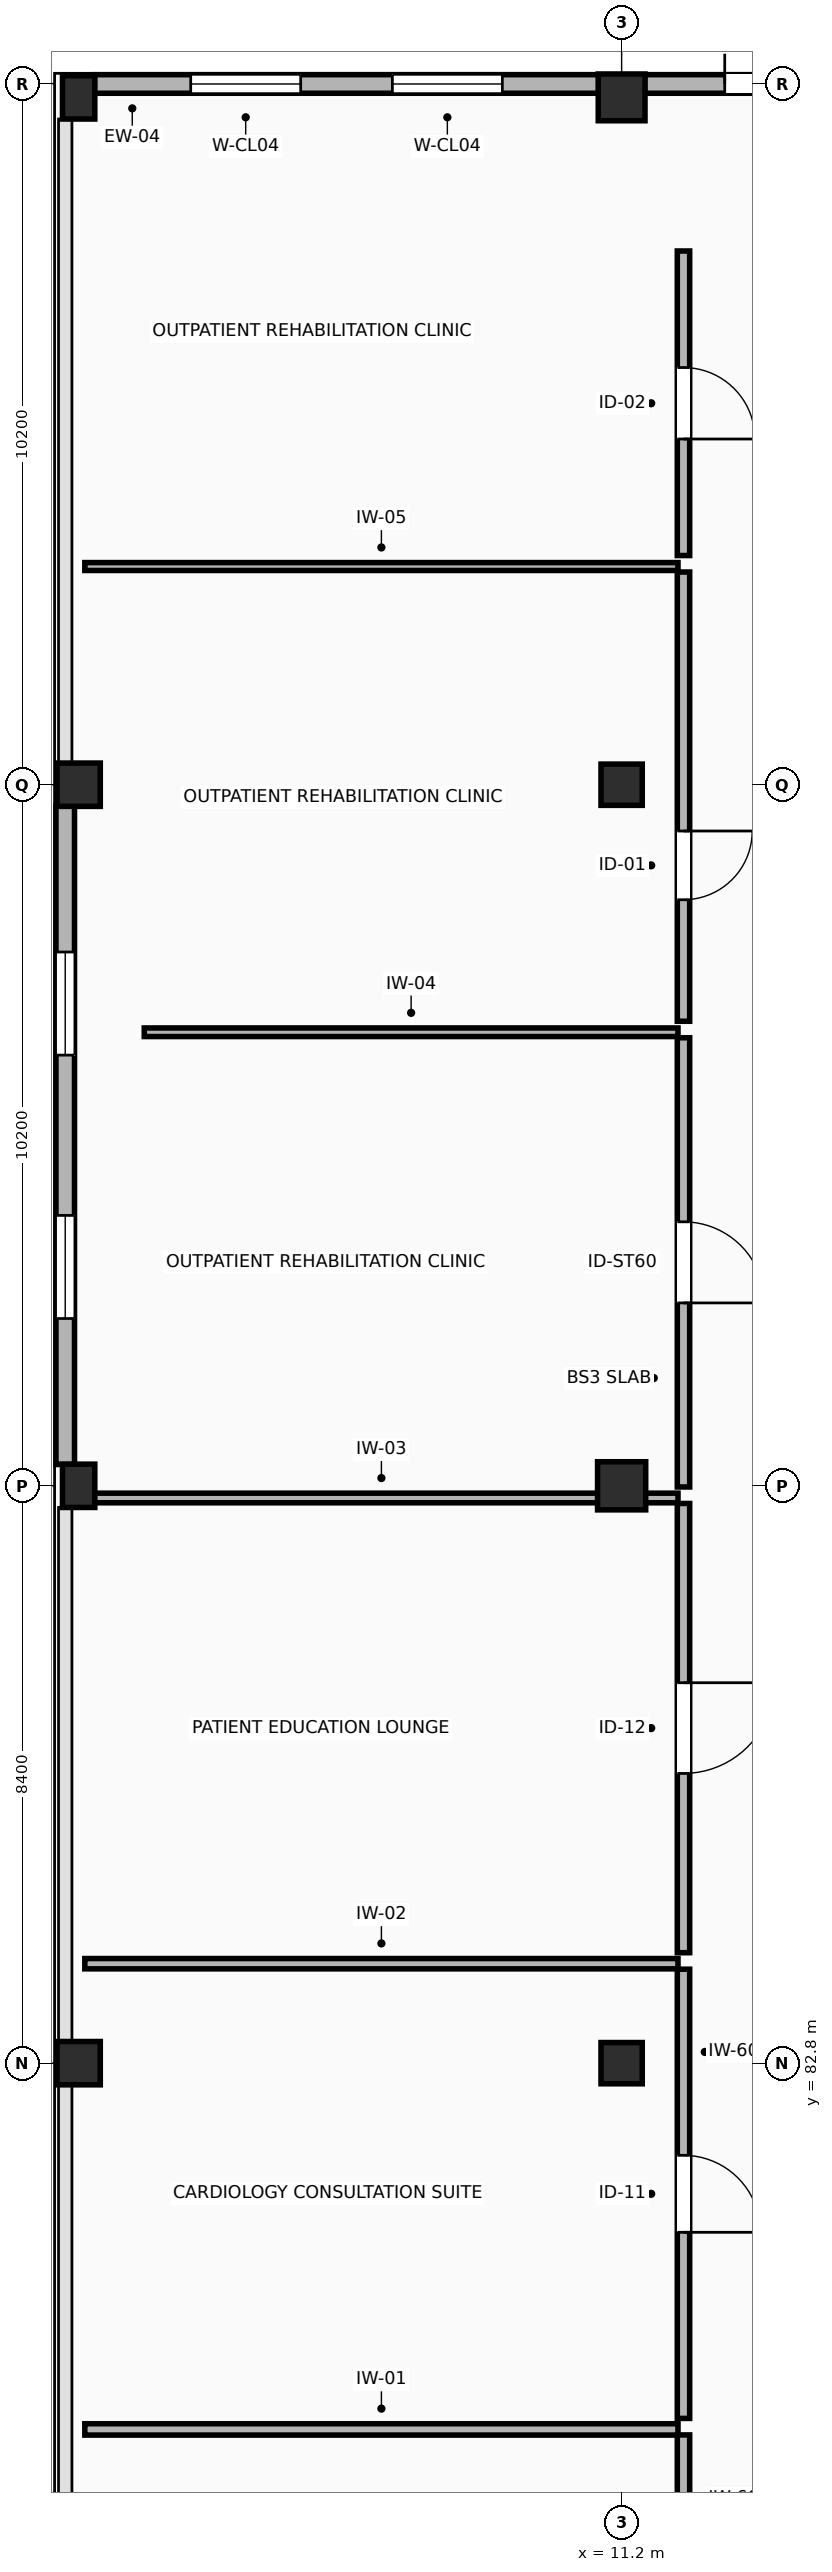
"""IFC4 building model, lengths in metres.
Left out: names, types, materials, properties, quantities, classifications, styles, units other than length and angle.
Written with IfcOpenShell. Run it as: python <this file> out.ifc"""

import sys

from ifc_helpers import new_model, si_unit, direction, frame, frame_2d, origin, origin_2d, place, context, subcontext, project, spatial, rectangle, extrude, element, fill, save


model = new_model("IFC4")
c1 = context("Model", 3, precision=1e-05, world=origin(), true_north=direction((0.0, 1.0)))
c2 = subcontext(c1, "Body", "Model", "MODEL_VIEW")
j1 = project(units=[si_unit("LENGTHUNIT", "METRE"), si_unit("PLANEANGLEUNIT", "RADIAN")], contexts=[c1])
p1 = place(None, origin())
s1 = spatial("IfcSite", under=j1, at=p1, CompositionType="ELEMENT")
p2 = place(p1, origin())
s2 = spatial("IfcBuilding", under=s1, at=p2, CompositionType="ELEMENT")
p3 = place(p2, origin())
s3 = spatial("IfcBuildingStorey", under=s2, at=p3, CompositionType="ELEMENT", Elevation=0.0)
p4 = place(p3, frame((3.3, 82.8, -1.75), z_axis=(0.0, 0.0, 1.0), x_axis=(1.0, 0.0, 0.0)))
e1 = element("IfcColumn", 1, at=p4, inside=s3, PredefinedType="COLUMN", context=c2, shape_type="SweptSolid", body=[
    extrude(rectangle(XDim=0.63, YDim=0.63, at=origin_2d()), origin(), (0.0, 0.0, 1.0), 7.15),
])
p5 = place(p3, frame((3.3, 91.2, -1.75), z_axis=(0.0, 0.0, 1.0), x_axis=(1.0, 0.0, 0.0)))
e2 = element("IfcColumn", 2, at=p5, inside=s3, PredefinedType="COLUMN", context=c2, shape_type="SweptSolid", body=[
    extrude(rectangle(XDim=0.47, YDim=0.63, at=origin_2d()), origin(), (0.0, 0.0, 1.0), 7.15),
])
p6 = place(p3, frame((3.3, 101.4, -1.75), z_axis=(0.0, 0.0, 1.0), x_axis=(1.0, 0.0, 0.0)))
e3 = element("IfcColumn", 3, at=p6, inside=s3, PredefinedType="COLUMN", context=c2, shape_type="SweptSolid", body=[
    extrude(rectangle(XDim=0.63, YDim=0.63, at=origin_2d()), origin(), (0.0, 0.0, 1.0), 7.15),
])
p7 = place(p3, frame((3.3, 111.4, -1.75), z_axis=(0.0, 0.0, 1.0), x_axis=(1.0, 0.0, 0.0)))
e4 = element("IfcColumn", 4, at=p7, inside=s3, PredefinedType="COLUMN", context=c2, shape_type="SweptSolid", body=[
    extrude(rectangle(XDim=0.47, YDim=0.63, at=origin_2d()), origin(), (0.0, 0.0, 1.0), 7.15),
])
p8 = place(p3, frame((11.2, 82.8, -1.75), z_axis=(0.0, 0.0, 1.0), x_axis=(1.0, 0.0, 0.0)))
e5 = element("IfcColumn", 5, at=p8, inside=s3, PredefinedType="COLUMN", context=c2, shape_type="SweptSolid", body=[
    extrude(rectangle(XDim=0.6, YDim=0.6, at=origin_2d()), origin(), (0.0, 0.0, 1.0), 7.15),
])
p9 = place(p3, frame((11.2, 91.2, -1.75), z_axis=(0.0, 0.0, 1.0), x_axis=(1.0, 0.0, 0.0)))
e6 = element("IfcColumn", 6, at=p9, inside=s3, PredefinedType="COLUMN", context=c2, shape_type="SweptSolid", body=[
    extrude(rectangle(XDim=0.7, YDim=0.7, at=origin_2d()), origin(), (0.0, 0.0, 1.0), 7.15),
])
p10 = place(p3, frame((11.2, 101.4, -1.75), z_axis=(0.0, 0.0, 1.0), x_axis=(1.0, 0.0, 0.0)))
e7 = element("IfcColumn", 7, at=p10, inside=s3, PredefinedType="COLUMN", context=c2, shape_type="SweptSolid", body=[
    extrude(rectangle(XDim=0.6, YDim=0.6, at=origin_2d()), origin(), (0.0, 0.0, 1.0), 7.15),
])
p11 = place(p3, frame((11.2, 111.4, -1.75), z_axis=(0.0, 0.0, 1.0), x_axis=(1.0, 0.0, 0.0)))
e8 = element("IfcColumn", 8, at=p11, inside=s3, PredefinedType="COLUMN", context=c2, shape_type="SweptSolid", body=[
    extrude(rectangle(XDim=0.68, YDim=0.68, at=origin_2d()), origin(), (0.0, 0.0, 1.0), 7.15),
])
p12 = place(p3, frame((19.29, 111.595, 0.0), z_axis=(0.0, 0.0, 1.0), x_axis=(-1.0, 0.0, 0.0)))
e9 = element("IfcWall", 9, at=p12, inside=s3, PredefinedType="STANDARD", context=c2, shape_type="SweptSolid", body=[
    extrude(rectangle(XDim=7.755, YDim=0.27, at=frame_2d((3.877, 0.0))), origin(), (0.0, 0.0, 1.0), 5.05),
])
p13 = place(p12, frame((4.59, 0.0, 0.0)))
e10 = element("IfcOpeningElement", 10, at=p13, cuts=e9, PredefinedType="OPENING", context=c2, shape_type="SweptSolid", body=[
    extrude(rectangle(XDim=2.0, YDim=2.4, at=frame_2d((1.0, 1.2))), frame((0.0, 0.145, 0.0), z_axis=(0.0, -1.0, 0.0), x_axis=(1.0, 0.0, 0.0)), (0.0, 0.0, 1.0), 0.29),
])
p14 = place(p3, frame((10.865, 111.595, 0.0), z_axis=(0.0, 0.0, 1.0), x_axis=(-1.0, 0.0, 0.0)))
e11 = element("IfcWall", 11, at=p14, inside=s3, PredefinedType="STANDARD", context=c2, shape_type="SweptSolid", body=[
    extrude(rectangle(XDim=7.335, YDim=0.27, at=frame_2d((3.667, 0.0))), origin(), (0.0, 0.0, 1.0), 5.05),
])
p15 = place(p14, frame((1.4, 0.0, 0.95)))
e12 = element("IfcOpeningElement", 12, at=p15, cuts=e11, PredefinedType="OPENING", context=c2, shape_type="SweptSolid", body=[
    extrude(rectangle(XDim=1.6, YDim=1.75, at=frame_2d((0.8, 0.875))), frame((0.0, 0.145, 0.0), z_axis=(0.0, -1.0, 0.0), x_axis=(1.0, 0.0, 0.0)), (0.0, 0.0, 1.0), 0.29),
])
p16 = place(p14, frame((4.334, 0.0, 0.95)))
e13 = element("IfcOpeningElement", 13, at=p16, cuts=e11, PredefinedType="OPENING", context=c2, shape_type="SweptSolid", body=[
    extrude(rectangle(XDim=1.6, YDim=1.75, at=frame_2d((0.8, 0.875))), frame((0.0, 0.145, 0.0), z_axis=(0.0, -1.0, 0.0), x_axis=(1.0, 0.0, 0.0)), (0.0, 0.0, 1.0), 0.29),
])
p17 = place(p3, frame((3.105, 101.09, 0.0), z_axis=(0.0, 0.0, 1.0), x_axis=(0.0, -1.0, 0.0)))
e14 = element("IfcWall", 14, at=p17, inside=s3, PredefinedType="STANDARD", context=c2, shape_type="SweptSolid", body=[
    extrude(rectangle(XDim=9.58, YDim=0.27, at=frame_2d((4.79, 0.0))), origin(), (0.0, 0.0, 1.0), 4.235),
])
p18 = place(p17, frame((2.124, 0.0, 0.95)))
e15 = element("IfcOpeningElement", 15, at=p18, cuts=e14, PredefinedType="OPENING", context=c2, shape_type="SweptSolid", body=[
    extrude(rectangle(XDim=1.5, YDim=1.65, at=frame_2d((0.75, 0.825))), frame((0.0, 0.145, 0.0), z_axis=(0.0, -1.0, 0.0), x_axis=(1.0, 0.0, 0.0)), (0.0, 0.0, 1.0), 0.29),
])
p19 = place(p17, frame((5.956, 0.0, 0.95)))
e16 = element("IfcOpeningElement", 16, at=p19, cuts=e14, PredefinedType="OPENING", context=c2, shape_type="SweptSolid", body=[
    extrude(rectangle(XDim=1.5, YDim=1.65, at=frame_2d((0.75, 0.825))), frame((0.0, 0.145, 0.0), z_axis=(0.0, -1.0, 0.0), x_axis=(1.0, 0.0, 0.0)), (0.0, 0.0, 1.0), 0.29),
])
p20 = place(p3, frame((3.39, 77.471, 0.0), z_axis=(0.0, 0.0, 1.0), x_axis=(1.0, 0.0, 0.0)))
e17 = element("IfcWall", 17, at=p20, inside=s3, PredefinedType="PARTITIONING", context=c2, shape_type="SweptSolid", body=[
    extrude(rectangle(XDim=8.63, YDim=0.165, at=frame_2d((4.315, 0.0))), origin(), (0.0, 0.0, 1.0), 5.05),
])
p21 = place(p3, frame((12.1, 77.391, 0.0), z_axis=(0.0, 0.0, 1.0), x_axis=(0.0, -1.0, 0.0)))
e18 = element("IfcWall", 18, at=p21, inside=s3, PredefinedType="PARTITIONING", context=c2, shape_type="SweptSolid", body=[
    extrude(rectangle(XDim=6.536, YDim=0.18, at=frame_2d((3.268, 0.0))), origin(), (0.0, 0.0, 1.0), 5.05),
])
p22 = place(p21, frame((2.158, 0.0, 0.0)))
e19 = element("IfcOpeningElement", 19, at=p22, cuts=e18, PredefinedType="OPENING", context=c2, shape_type="SweptSolid", body=[
    extrude(rectangle(XDim=1.22, YDim=2.18, at=frame_2d((0.61, 1.09))), frame((0.0, 0.1, 0.0), z_axis=(0.0, -1.0, 0.0), x_axis=(1.0, 0.0, 0.0)), (0.0, 0.0, 1.0), 0.2),
])
p23 = place(p3, frame((3.39, 84.247, 0.0), z_axis=(0.0, 0.0, 1.0), x_axis=(1.0, 0.0, 0.0)))
e20 = element("IfcWall", 20, at=p23, inside=s3, PredefinedType="PARTITIONING", context=c2, shape_type="SweptSolid", body=[
    extrude(rectangle(XDim=8.63, YDim=0.15, at=frame_2d((4.315, 0.0))), origin(), (0.0, 0.0, 1.0), 5.05),
])
p24 = place(p3, frame((12.1, 84.167, 0.0), z_axis=(0.0, 0.0, 1.0), x_axis=(0.0, -1.0, 0.0)))
e21 = element("IfcWall", 21, at=p24, inside=s3, PredefinedType="PARTITIONING", context=c2, shape_type="SweptSolid", body=[
    extrude(rectangle(XDim=6.536, YDim=0.18, at=frame_2d((3.268, 0.0))), origin(), (0.0, 0.0, 1.0), 5.05),
])
p25 = place(p24, frame((2.708, 0.0, 0.0)))
e22 = element("IfcOpeningElement", 22, at=p25, cuts=e21, PredefinedType="OPENING", context=c2, shape_type="SweptSolid", body=[
    extrude(rectangle(XDim=1.12, YDim=2.16, at=frame_2d((0.56, 1.08))), frame((0.0, 0.1, 0.0), z_axis=(0.0, -1.0, 0.0), x_axis=(1.0, 0.0, 0.0)), (0.0, 0.0, 1.0), 0.2),
])
p26 = place(p3, frame((3.39, 91.023, 0.0), z_axis=(0.0, 0.0, 1.0), x_axis=(1.0, 0.0, 0.0)))
e23 = element("IfcWall", 23, at=p26, inside=s3, PredefinedType="PARTITIONING", context=c2, shape_type="SweptSolid", body=[
    extrude(rectangle(XDim=8.63, YDim=0.14, at=frame_2d((4.315, 0.0))), origin(), (0.0, 0.0, 1.0), 5.05),
])
p27 = place(p3, frame((12.1, 90.943, 0.0), z_axis=(0.0, 0.0, 1.0), x_axis=(0.0, -1.0, 0.0)))
e24 = element("IfcWall", 24, at=p27, inside=s3, PredefinedType="PARTITIONING", context=c2, shape_type="SweptSolid", body=[
    extrude(rectangle(XDim=6.536, YDim=0.18, at=frame_2d((3.268, 0.0))), origin(), (0.0, 0.0, 1.0), 5.05),
])
p28 = place(p27, frame((2.608, 0.0, 0.0)))
e25 = element("IfcOpeningElement", 25, at=p28, cuts=e24, PredefinedType="OPENING", context=c2, shape_type="SweptSolid", body=[
    extrude(rectangle(XDim=1.32, YDim=2.22, at=frame_2d((0.66, 1.11))), frame((0.0, 0.1, 0.0), z_axis=(0.0, -1.0, 0.0), x_axis=(1.0, 0.0, 0.0)), (0.0, 0.0, 1.0), 0.2),
])
p29 = place(p3, frame((4.255, 97.799, 0.0), z_axis=(0.0, 0.0, 1.0), x_axis=(1.0, 0.0, 0.0)))
e26 = element("IfcWall", 26, at=p29, inside=s3, PredefinedType="PARTITIONING", context=c2, shape_type="SweptSolid", body=[
    extrude(rectangle(XDim=7.765, YDim=0.125, at=frame_2d((3.883, 0.0))), origin(), (0.0, 0.0, 1.0), 5.05),
])
p30 = place(p3, frame((12.1, 97.719, 0.0), z_axis=(0.0, 0.0, 1.0), x_axis=(0.0, -1.0, 0.0)))
e27 = element("IfcWall", 27, at=p30, inside=s3, PredefinedType="PARTITIONING", context=c2, shape_type="SweptSolid", body=[
    extrude(rectangle(XDim=6.536, YDim=0.18, at=frame_2d((3.268, 0.0))), origin(), (0.0, 0.0, 1.0), 5.05),
])
p31 = place(p30, frame((2.678, 0.0, 0.0)))
e28 = element("IfcOpeningElement", 28, at=p31, cuts=e27, PredefinedType="OPENING", context=c2, shape_type="SweptSolid", body=[
    extrude(rectangle(XDim=1.18, YDim=2.18, at=frame_2d((0.59, 1.09))), frame((0.0, 0.1, 0.0), z_axis=(0.0, -1.0, 0.0), x_axis=(1.0, 0.0, 0.0)), (0.0, 0.0, 1.0), 0.2),
])
p32 = place(p3, frame((3.39, 104.574, 0.0), z_axis=(0.0, 0.0, 1.0), x_axis=(1.0, 0.0, 0.0)))
e29 = element("IfcWall", 29, at=p32, inside=s3, PredefinedType="PARTITIONING", context=c2, shape_type="SweptSolid", body=[
    extrude(rectangle(XDim=8.63, YDim=0.115, at=frame_2d((4.315, 0.0))), origin(), (0.0, 0.0, 1.0), 5.05),
])
p33 = place(p3, frame((12.1, 104.494, 0.0), z_axis=(0.0, 0.0, 1.0), x_axis=(0.0, -1.0, 0.0)))
e30 = element("IfcWall", 30, at=p33, inside=s3, PredefinedType="PARTITIONING", context=c2, shape_type="SweptSolid", body=[
    extrude(rectangle(XDim=6.536, YDim=0.18, at=frame_2d((3.268, 0.0))), origin(), (0.0, 0.0, 1.0), 5.05),
])
p34 = place(p33, frame((3.768, 0.0, 0.0)))
e31 = element("IfcOpeningElement", 31, at=p34, cuts=e30, PredefinedType="OPENING", context=c2, shape_type="SweptSolid", body=[
    extrude(rectangle(XDim=1.0, YDim=2.15, at=frame_2d((0.5, 1.075))), frame((0.0, 0.1, 0.0), z_axis=(0.0, -1.0, 0.0), x_axis=(1.0, 0.0, 0.0)), (0.0, 0.0, 1.0), 0.2),
])
p35 = place(p3, frame((12.1, 109.165, 0.0), z_axis=(0.0, 0.0, 1.0), x_axis=(0.0, -1.0, 0.0)))
e32 = element("IfcWall", 32, at=p35, inside=s3, PredefinedType="PARTITIONING", context=c2, shape_type="SweptSolid", body=[
    extrude(rectangle(XDim=4.431, YDim=0.18, at=frame_2d((2.215, 0.0))), origin(), (0.0, 0.0, 1.0), 5.05),
])
p36 = place(p35, frame((1.695, 0.0, 0.0)))
e33 = element("IfcOpeningElement", 33, at=p36, cuts=e32, PredefinedType="OPENING", context=c2, shape_type="SweptSolid", body=[
    extrude(rectangle(XDim=1.04, YDim=2.15, at=frame_2d((0.52, 1.075))), frame((0.0, 0.1, 0.0), z_axis=(0.0, -1.0, 0.0), x_axis=(1.0, 0.0, 0.0)), (0.0, 0.0, 1.0), 0.2),
])
p37 = place(p13, frame((2.0, 0.0, 0.0), z_axis=(0.0, 0.0, 1.0), x_axis=(-1.0, 0.0, 0.0)))
e34 = element("IfcDoor", 34, at=p37, inside=s3, OperationType="DOUBLE_DOOR_SINGLE_SWING", PredefinedType="DOOR", context=c2, shape_type="SweptSolid", body=[
    extrude(rectangle(XDim=2.0, YDim=2.4, at=frame_2d((1.0, 1.2))), frame((0.0, 0.025, 0.0), z_axis=(0.0, -1.0, 0.0), x_axis=(1.0, 0.0, 0.0)), (0.0, 0.0, 1.0), 0.05),
])
fill(e10, e34)
p38 = place(p15, origin())
e35 = element("IfcWindow", 35, at=p38, inside=s3, PartitioningType="SINGLE_PANEL", PredefinedType="WINDOW", context=c2, shape_type="SweptSolid", body=[
    extrude(rectangle(XDim=1.6, YDim=1.75, at=frame_2d((0.8, 0.875))), frame((0.0, 0.03, 0.0), z_axis=(0.0, -1.0, 0.0), x_axis=(1.0, 0.0, 0.0)), (0.0, 0.0, 1.0), 0.06),
])
fill(e12, e35)
p39 = place(p16, origin())
e36 = element("IfcWindow", 36, at=p39, inside=s3, PartitioningType="SINGLE_PANEL", PredefinedType="WINDOW", context=c2, shape_type="SweptSolid", body=[
    extrude(rectangle(XDim=1.6, YDim=1.75, at=frame_2d((0.8, 0.875))), frame((0.0, 0.03, 0.0), z_axis=(0.0, -1.0, 0.0), x_axis=(1.0, 0.0, 0.0)), (0.0, 0.0, 1.0), 0.06),
])
fill(e13, e36)
p40 = place(p18, origin())
e37 = element("IfcWindow", 37, at=p40, inside=s3, PartitioningType="SINGLE_PANEL", PredefinedType="WINDOW", context=c2, shape_type="SweptSolid", body=[
    extrude(rectangle(XDim=1.5, YDim=1.65, at=frame_2d((0.75, 0.825))), frame((0.0, 0.03, 0.0), z_axis=(0.0, -1.0, 0.0), x_axis=(1.0, 0.0, 0.0)), (0.0, 0.0, 1.0), 0.06),
])
fill(e15, e37)
p41 = place(p19, origin())
e38 = element("IfcWindow", 38, at=p41, inside=s3, PartitioningType="SINGLE_PANEL", PredefinedType="WINDOW", context=c2, shape_type="SweptSolid", body=[
    extrude(rectangle(XDim=1.5, YDim=1.65, at=frame_2d((0.75, 0.825))), frame((0.0, 0.03, 0.0), z_axis=(0.0, -1.0, 0.0), x_axis=(1.0, 0.0, 0.0)), (0.0, 0.0, 1.0), 0.06),
])
fill(e16, e38)
p42 = place(p25, origin())
e39 = element("IfcDoor", 39, at=p42, inside=s3, OperationType="SINGLE_SWING_RIGHT", PredefinedType="DOOR", context=c2, shape_type="SweptSolid", body=[
    extrude(rectangle(XDim=1.12, YDim=2.16, at=frame_2d((0.56, 1.08))), frame((0.0, 0.025, 0.0), z_axis=(0.0, -1.0, 0.0), x_axis=(1.0, 0.0, 0.0)), (0.0, 0.0, 1.0), 0.05),
])
fill(e22, e39)
p43 = place(p28, origin())
e40 = element("IfcDoor", 40, at=p43, inside=s3, OperationType="SINGLE_SWING_LEFT", PredefinedType="DOOR", context=c2, shape_type="SweptSolid", body=[
    extrude(rectangle(XDim=1.32, YDim=2.22, at=frame_2d((0.66, 1.11))), frame((0.0, 0.025, 0.0), z_axis=(0.0, -1.0, 0.0), x_axis=(1.0, 0.0, 0.0)), (0.0, 0.0, 1.0), 0.05),
])
fill(e25, e40)
p44 = place(p31, origin())
e41 = element("IfcDoor", 41, at=p44, inside=s3, OperationType="SINGLE_SWING_RIGHT", PredefinedType="DOOR", context=c2, shape_type="SweptSolid", body=[
    extrude(rectangle(XDim=1.18, YDim=2.18, at=frame_2d((0.59, 1.09))), frame((0.0, 0.025, 0.0), z_axis=(0.0, -1.0, 0.0), x_axis=(1.0, 0.0, 0.0)), (0.0, 0.0, 1.0), 0.05),
])
fill(e28, e41)
p45 = place(p34, origin())
e42 = element("IfcDoor", 42, at=p45, inside=s3, OperationType="SINGLE_SWING_LEFT", PredefinedType="DOOR", context=c2, shape_type="SweptSolid", body=[
    extrude(rectangle(XDim=1.0, YDim=2.15, at=frame_2d((0.5, 1.075))), frame((0.0, 0.025, 0.0), z_axis=(0.0, -1.0, 0.0), x_axis=(1.0, 0.0, 0.0)), (0.0, 0.0, 1.0), 0.05),
])
fill(e31, e42)
p46 = place(p36, origin())
e43 = element("IfcDoor", 43, at=p46, inside=s3, OperationType="SINGLE_SWING_RIGHT", PredefinedType="DOOR", context=c2, shape_type="SweptSolid", body=[
    extrude(rectangle(XDim=1.04, YDim=2.15, at=frame_2d((0.52, 1.075))), frame((0.0, 0.025, 0.0), z_axis=(0.0, -1.0, 0.0), x_axis=(1.0, 0.0, 0.0)), (0.0, 0.0, 1.0), 0.05),
])
fill(e33, e43)
save(model, sys.argv[1])
